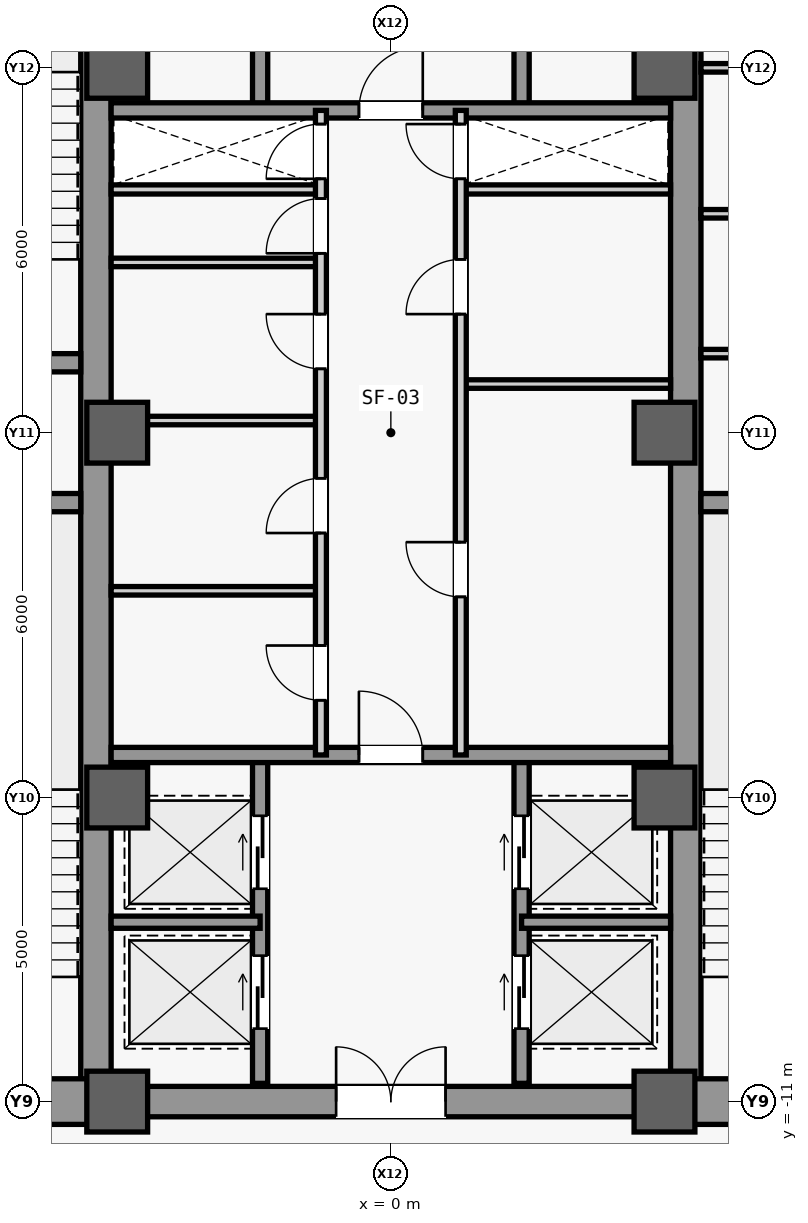
"""IFC4 building model, lengths in metres.
Left out: names, types, materials, properties, quantities, classifications, styles, units other than length and angle.
Written with IfcOpenShell. Run it as: python <this file> out.ifc"""

import sys

from ifc_helpers import new_model, si_unit, direction, frame, frame_2d, origin, origin_2d, place, context, subcontext, project, spatial, rectangle, extrude, source, transform, mapped, element, fill, save


model = new_model("IFC4")
c1 = context("Model", 3, precision=1e-05, world=origin(), true_north=direction((0.0, 1.0)))
c2 = subcontext(c1, "Body", "Model", "MODEL_VIEW")
j1 = project(units=[si_unit("LENGTHUNIT", "METRE"), si_unit("PLANEANGLEUNIT", "RADIAN")], contexts=[c1])
p1 = place(None, origin())
s1 = spatial("IfcSite", under=j1, at=p1, CompositionType="ELEMENT")
p2 = place(p1, origin())
s2 = spatial("IfcBuilding", under=s1, at=p2, CompositionType="ELEMENT")
p3 = place(p2, frame((0.0, 0.0, 103.7)))
s3 = spatial("IfcBuildingStorey", under=s2, at=p3, CompositionType="ELEMENT", Elevation=103.7)
m1 = source(origin(), c2, "Body", "SweptSolid", [
    extrude(rectangle(XDim=21.4, YDim=0.5, at=frame_2d((10.7, 0.0))), origin(), (0.0, 0.0, 1.0), 3.84),
])
for number, where, z_axis, x_axis in (
    (1, (-4.85, -10.7, 0.0), (0.0, 0.0, 1.0), (0.0, 1.0, 0.0)),
    (2, (4.85, -10.7, 0.0), (0.0, 0.0, 1.0), (0.0, 1.0, 0.0)),
):
    element("IfcWall", number, at=place(p3, frame(where, z_axis=z_axis, x_axis=x_axis)), inside=s3, PredefinedType="SHEAR", context=c2, shape_type="MappedRepresentation", body=[
        mapped(m1, transform((0.0, 0.0, 0.0), scale=1.0)),
    ])
m2 = source(origin(), c2, "Body", "SweptSolid", [
    extrude(rectangle(XDim=5.85, YDim=0.75, at=frame_2d((2.925, 0.0))), origin(), (0.0, 0.0, 1.0), 3.84),
])
for number, where, z_axis, x_axis in (
    (3, (-10.7, -11.0, 0.0), (0.0, 0.0, 1.0), (1.0, 0.0, 0.0)),
    (4, (4.85, -11.0, 0.0), (0.0, 0.0, 1.0), (1.0, 0.0, 0.0)),
):
    element("IfcWall", number, at=place(p3, frame(where, z_axis=z_axis, x_axis=x_axis)), inside=s3, PredefinedType="SHEAR", context=c2, shape_type="MappedRepresentation", body=[
        mapped(m2, transform((0.0, 0.0, 0.0), scale=1.0)),
    ])
m3 = source(origin(), c2, "Body", "SweptSolid", [
    extrude(rectangle(XDim=5.6, YDim=0.3, at=frame_2d((2.8, 0.0))), origin(), (0.0, 0.0, 1.0), 3.84),
])
for number, where, z_axis, x_axis in (
    (5, (-10.7, -1.15, 0.0), (0.0, 0.0, 1.0), (1.0, 0.0, 0.0)),
    (6, (-10.7, 1.15, 0.0), (0.0, 0.0, 1.0), (1.0, 0.0, 0.0)),
    (7, (5.1, -1.15, 0.0), (0.0, 0.0, 1.0), (1.0, 0.0, 0.0)),
):
    element("IfcWall", number, at=place(p3, frame(where, z_axis=z_axis, x_axis=x_axis)), inside=s3, PredefinedType="SHEAR", context=c2, shape_type="MappedRepresentation", body=[
        mapped(m3, transform((0.0, 0.0, 0.0), scale=1.0)),
    ])
m4 = source(origin(), c2, "Body", "SweptSolid", [
    extrude(rectangle(XDim=9.2, YDim=0.5, at=frame_2d((4.6, 0.0))), origin(), (0.0, 0.0, 1.0), 3.84),
])
p4 = place(p3, frame((-4.6, -11.0, 0.0), z_axis=(0.0, 0.0, 1.0), x_axis=(1.0, 0.0, 0.0)))
e8 = element("IfcWall", 8, at=p4, inside=s3, PredefinedType="SHEAR", context=c2, shape_type="MappedRepresentation", body=[
    mapped(m4, transform((0.0, 0.0, 0.0), scale=1.0)),
])
m5 = source(origin(), c2, "Body", "SweptSolid", [
    extrude(rectangle(XDim=1.8, YDim=2.25, at=frame_2d((0.9, 1.125))), frame((0.0, 0.26, 0.0), z_axis=(0.0, -1.0, 0.0), x_axis=(1.0, 0.0, 0.0)), (0.0, 0.0, 1.0), 0.52),
])
p5 = place(p4, frame((3.7, 0.0, 0.0)))
e9 = element("IfcOpeningElement", 9, at=p5, cuts=e8, PredefinedType="OPENING", context=c2, shape_type="MappedRepresentation", body=[
    mapped(m5, transform((0.0, 0.0, 0.0), scale=1.0)),
])
m6 = source(origin(), c2, "Body", "SweptSolid", [
    extrude(rectangle(XDim=1.0, YDim=1.0, at=origin_2d()), origin(), (0.0, 0.0, 1.0), 4.1),
])
for number, where, z_axis, x_axis in (
    (10, (-4.5, -11.0, 0.0), (0.0, 0.0, 1.0), (1.0, 0.0, 0.0)),
    (11, (-4.5, -6.0, 0.0), (0.0, 0.0, 1.0), (1.0, 0.0, 0.0)),
    (12, (-4.5, 0.0, 0.0), (0.0, 0.0, 1.0), (1.0, 0.0, 0.0)),
    (13, (-4.5, 6.0, 0.0), (0.0, 0.0, 1.0), (1.0, 0.0, 0.0)),
    (14, (4.5, -11.0, 0.0), (0.0, 0.0, 1.0), (1.0, 0.0, 0.0)),
    (15, (4.5, -6.0, 0.0), (0.0, 0.0, 1.0), (1.0, 0.0, 0.0)),
    (16, (4.5, 0.0, 0.0), (0.0, 0.0, 1.0), (1.0, 0.0, 0.0)),
    (17, (4.5, 6.0, 0.0), (0.0, 0.0, 1.0), (1.0, 0.0, 0.0)),
):
    element("IfcColumn", number, at=place(p3, frame(where, z_axis=z_axis, x_axis=x_axis)), inside=s3, PredefinedType="COLUMN", context=c2, shape_type="MappedRepresentation", body=[
        mapped(m6, transform((0.0, 0.0, 0.0), scale=1.0)),
    ])
m7 = source(origin(), c2, "Body", "SweptSolid", [
    extrude(rectangle(XDim=3.15, YDim=0.14, at=frame_2d((1.575, 0.0))), origin(), (0.0, 0.0, 1.0), 3.84),
])
p6 = place(p3, frame((5.1, 1.3, 0.0), z_axis=(0.0, 0.0, 1.0), x_axis=(1.0, 0.0, 0.0)))
e18 = element("IfcWall", 18, at=p6, inside=s3, PredefinedType="PARTITIONING", context=c2, shape_type="MappedRepresentation", body=[
    mapped(m7, transform((0.0, 0.0, 0.0), scale=1.0)),
])
p7 = place(p3, frame((5.1, 6.0, 0.0), z_axis=(0.0, 0.0, 1.0), x_axis=(1.0, 0.0, 0.0)))
e19 = element("IfcWall", 19, at=p7, inside=s3, PredefinedType="PARTITIONING", context=c2, shape_type="MappedRepresentation", body=[
    mapped(m7, transform((0.0, 0.0, 0.0), scale=1.0)),
])
m8 = source(origin(), c2, "Body", "SweptSolid", [
    extrude(rectangle(XDim=0.9, YDim=2.15, at=frame_2d((0.45, 1.075))), frame((0.0, 0.08, 0.0), z_axis=(0.0, -1.0, 0.0), x_axis=(1.0, 0.0, 0.0)), (0.0, 0.0, 1.0), 0.16),
])
p8 = place(p7, frame((1.13, 0.0, 0.0)))
e20 = element("IfcOpeningElement", 20, at=p8, cuts=e19, PredefinedType="OPENING", context=c2, shape_type="MappedRepresentation", body=[
    mapped(m8, transform((0.0, 0.0, 0.0), scale=1.0)),
])
p9 = place(p3, frame((5.1, 3.6, 0.0), z_axis=(0.0, 0.0, 1.0), x_axis=(1.0, 0.0, 0.0)))
e21 = element("IfcWall", 21, at=p9, inside=s3, PredefinedType="PARTITIONING", context=c2, shape_type="MappedRepresentation", body=[
    mapped(m7, transform((0.0, 0.0, 0.0), scale=1.0)),
])
p10 = place(p9, frame((1.13, 0.0, 0.0)))
e22 = element("IfcOpeningElement", 22, at=p10, cuts=e21, PredefinedType="OPENING", context=c2, shape_type="MappedRepresentation", body=[
    mapped(m8, transform((0.0, 0.0, 0.0), scale=1.0)),
])
m9 = source(origin(), c2, "Body", "SweptSolid", [
    extrude(rectangle(XDim=3.45, YDim=0.15, at=frame_2d((1.725, 0.0))), origin(), (0.0, 0.0, 1.0), 3.84),
])
for number, where, z_axis, x_axis in (
    (23, (-4.6, 4.0, 0.0), (0.0, 0.0, 1.0), (1.0, 0.0, 0.0)),
    (24, (1.15, 4.0, 0.0), (0.0, 0.0, 1.0), (1.0, 0.0, 0.0)),
):
    element("IfcWall", number, at=place(p3, frame(where, z_axis=z_axis, x_axis=x_axis)), inside=s3, PredefinedType="PARTITIONING", context=c2, shape_type="MappedRepresentation", body=[
        mapped(m9, transform((0.0, 0.0, 0.0), scale=1.0)),
    ])
m10 = source(origin(), c2, "Body", "SweptSolid", [
    extrude(rectangle(XDim=5.4, YDim=0.25, at=frame_2d((2.7, 0.0))), origin(), (0.0, 0.0, 1.0), 3.84),
])
p11 = place(p3, frame((-2.15, -10.7, 0.0), z_axis=(0.0, 0.0, 1.0), x_axis=(0.0, 1.0, 0.0)))
e25 = element("IfcWall", 25, at=p11, inside=s3, PredefinedType="SHEAR", context=c2, shape_type="MappedRepresentation", body=[
    mapped(m10, transform((0.0, 0.0, 0.0), scale=1.0)),
])
m11 = source(origin(), c2, "Body", "SweptSolid", [
    extrude(rectangle(XDim=1.2, YDim=2.3, at=frame_2d((0.6, 1.15))), frame((0.0, 0.135, 0.0), z_axis=(0.0, -1.0, 0.0), x_axis=(1.0, 0.0, 0.0)), (0.0, 0.0, 1.0), 0.27),
])
p12 = place(p11, frame((0.9, 0.0, 0.0)))
e26 = element("IfcOpeningElement", 26, at=p12, cuts=e25, PredefinedType="OPENING", context=c2, shape_type="MappedRepresentation", body=[
    mapped(m11, transform((0.0, 0.0, 0.0), scale=1.0)),
])
p13 = place(p11, frame((3.2, 0.0, 0.0)))
e27 = element("IfcOpeningElement", 27, at=p13, cuts=e25, PredefinedType="OPENING", context=c2, shape_type="MappedRepresentation", body=[
    mapped(m11, transform((0.0, 0.0, 0.0), scale=1.0)),
])
p14 = place(p3, frame((2.15, -10.7, 0.0), z_axis=(0.0, 0.0, 1.0), x_axis=(0.0, 1.0, 0.0)))
e28 = element("IfcWall", 28, at=p14, inside=s3, PredefinedType="SHEAR", context=c2, shape_type="MappedRepresentation", body=[
    mapped(m10, transform((0.0, 0.0, 0.0), scale=1.0)),
])
p15 = place(p14, frame((0.9, 0.0, 0.0)))
e29 = element("IfcOpeningElement", 29, at=p15, cuts=e28, PredefinedType="OPENING", context=c2, shape_type="MappedRepresentation", body=[
    mapped(m11, transform((0.0, 0.0, 0.0), scale=1.0)),
])
p16 = place(p14, frame((3.2, 0.0, 0.0)))
e30 = element("IfcOpeningElement", 30, at=p16, cuts=e28, PredefinedType="OPENING", context=c2, shape_type="MappedRepresentation", body=[
    mapped(m11, transform((0.0, 0.0, 0.0), scale=1.0)),
])
m12 = source(origin(), c2, "Body", "SweptSolid", [
    extrude(rectangle(XDim=2.45, YDim=0.2, at=frame_2d((1.225, 0.0))), origin(), (0.0, 0.0, 1.0), 3.84),
])
for number, where, z_axis, x_axis in (
    (31, (-4.6, -8.05, 0.0), (0.0, 0.0, 1.0), (1.0, 0.0, 0.0)),
    (32, (2.15, -8.05, 0.0), (0.0, 0.0, 1.0), (1.0, 0.0, 0.0)),
):
    element("IfcWall", number, at=place(p3, frame(where, z_axis=z_axis, x_axis=x_axis)), inside=s3, PredefinedType="SHEAR", context=c2, shape_type="MappedRepresentation", body=[
        mapped(m12, transform((0.0, 0.0, 0.0), scale=1.0)),
    ])
m13 = source(origin(), c2, "Body", "SweptSolid", [
    extrude(rectangle(XDim=9.2, YDim=0.25, at=frame_2d((4.6, 0.0))), origin(), (0.0, 0.0, 1.0), 3.84),
])
p17 = place(p3, frame((-4.6, -5.3, 0.0), z_axis=(0.0, 0.0, 1.0), x_axis=(1.0, 0.0, 0.0)))
e33 = element("IfcWall", 33, at=p17, inside=s3, PredefinedType="SHEAR", context=c2, shape_type="MappedRepresentation", body=[
    mapped(m13, transform((0.0, 0.0, 0.0), scale=1.0)),
])
m14 = source(origin(), c2, "Body", "SweptSolid", [
    extrude(rectangle(XDim=1.05, YDim=2.2, at=frame_2d((0.525, 1.1))), frame((0.0, 0.135, 0.0), z_axis=(0.0, -1.0, 0.0), x_axis=(1.0, 0.0, 0.0)), (0.0, 0.0, 1.0), 0.27),
])
p18 = place(p17, frame((4.075, 0.0, 0.0)))
e34 = element("IfcOpeningElement", 34, at=p18, cuts=e33, PredefinedType="OPENING", context=c2, shape_type="MappedRepresentation", body=[
    mapped(m14, transform((0.0, 0.0, 0.0), scale=1.0)),
])
for number, where, z_axis, x_axis in (
    (35, (-2.15, 5.3, 0.0), (0.0, 0.0, 1.0), (0.0, 1.0, 0.0)),
    (36, (2.15, 5.3, 0.0), (0.0, 0.0, 1.0), (0.0, 1.0, 0.0)),
):
    element("IfcWall", number, at=place(p3, frame(where, z_axis=z_axis, x_axis=x_axis)), inside=s3, PredefinedType="SHEAR", context=c2, shape_type="MappedRepresentation", body=[
        mapped(m10, transform((0.0, 0.0, 0.0), scale=1.0)),
    ])
p19 = place(p3, frame((-4.6, 5.3, 0.0), z_axis=(0.0, 0.0, 1.0), x_axis=(1.0, 0.0, 0.0)))
e37 = element("IfcWall", 37, at=p19, inside=s3, PredefinedType="SHEAR", context=c2, shape_type="MappedRepresentation", body=[
    mapped(m13, transform((0.0, 0.0, 0.0), scale=1.0)),
])
p20 = place(p19, frame((4.075, 0.0, 0.0)))
e38 = element("IfcOpeningElement", 38, at=p20, cuts=e37, PredefinedType="OPENING", context=c2, shape_type="MappedRepresentation", body=[
    mapped(m14, transform((0.0, 0.0, 0.0), scale=1.0)),
])
m15 = source(origin(), c2, "Body", "SweptSolid", [
    extrude(rectangle(XDim=3.45, YDim=0.14, at=frame_2d((1.725, 0.0))), origin(), (0.0, 0.0, 1.0), 3.84),
])
p21 = place(p3, frame((-4.6, -2.6, 0.0), z_axis=(0.0, 0.0, 1.0), x_axis=(1.0, 0.0, 0.0)))
e39 = element("IfcWall", 39, at=p21, inside=s3, PredefinedType="PARTITIONING", context=c2, shape_type="MappedRepresentation", body=[
    mapped(m15, transform((0.0, 0.0, 0.0), scale=1.0)),
])
m16 = source(origin(), c2, "Body", "SweptSolid", [
    extrude(rectangle(XDim=3.45, YDim=0.14, at=frame_2d((1.725, 0.0))), origin(), (0.0, 0.0, 1.0), 3.145),
])
p22 = place(p3, frame((-4.6, 0.2, 0.0), z_axis=(0.0, 0.0, 1.0), x_axis=(1.0, 0.0, 0.0)))
e40 = element("IfcWall", 40, at=p22, inside=s3, PredefinedType="PARTITIONING", context=c2, shape_type="MappedRepresentation", body=[
    mapped(m16, transform((0.0, 0.0, 0.0), scale=1.0)),
])
p23 = place(p3, frame((-4.6, 2.8, 0.0), z_axis=(0.0, 0.0, 1.0), x_axis=(1.0, 0.0, 0.0)))
e41 = element("IfcWall", 41, at=p23, inside=s3, PredefinedType="PARTITIONING", context=c2, shape_type="MappedRepresentation", body=[
    mapped(m15, transform((0.0, 0.0, 0.0), scale=1.0)),
])
m17 = source(origin(), c2, "Body", "SweptSolid", [
    extrude(rectangle(XDim=10.6, YDim=0.18, at=frame_2d((5.3, 0.0))), origin(), (0.0, 0.0, 1.0), 3.84),
])
p24 = place(p3, frame((-1.15, -5.3, 0.0), z_axis=(0.0, 0.0, 1.0), x_axis=(0.0, 1.0, 0.0)))
e42 = element("IfcWall", 42, at=p24, inside=s3, PredefinedType="PARTITIONING", context=c2, shape_type="MappedRepresentation", body=[
    mapped(m17, transform((0.0, 0.0, 0.0), scale=1.0)),
])
m18 = source(origin(), c2, "Body", "SweptSolid", [
    extrude(rectangle(XDim=0.9, YDim=2.15, at=frame_2d((0.45, 1.075))), frame((0.0, 0.1, 0.0), z_axis=(0.0, -1.0, 0.0), x_axis=(1.0, 0.0, 0.0)), (0.0, 0.0, 1.0), 0.2),
])
p25 = place(p24, frame((0.9, 0.0, 0.0)))
e43 = element("IfcOpeningElement", 43, at=p25, cuts=e42, PredefinedType="OPENING", context=c2, shape_type="MappedRepresentation", body=[
    mapped(m18, transform((0.0, 0.0, 0.0), scale=1.0)),
])
p26 = place(p24, frame((3.65, 0.0, 0.0)))
e44 = element("IfcOpeningElement", 44, at=p26, cuts=e42, PredefinedType="OPENING", context=c2, shape_type="MappedRepresentation", body=[
    mapped(m18, transform((0.0, 0.0, 0.0), scale=1.0)),
])
p27 = place(p24, frame((6.35, 0.0, 0.0)))
e45 = element("IfcOpeningElement", 45, at=p27, cuts=e42, PredefinedType="OPENING", context=c2, shape_type="MappedRepresentation", body=[
    mapped(m18, transform((0.0, 0.0, 0.0), scale=1.0)),
])
p28 = place(p24, frame((8.25, 0.0, 0.0)))
e46 = element("IfcOpeningElement", 46, at=p28, cuts=e42, PredefinedType="OPENING", context=c2, shape_type="MappedRepresentation", body=[
    mapped(m18, transform((0.0, 0.0, 0.0), scale=1.0)),
])
p29 = place(p24, frame((9.475, 0.0, 0.0)))
e47 = element("IfcOpeningElement", 47, at=p29, cuts=e42, PredefinedType="OPENING", context=c2, shape_type="MappedRepresentation", body=[
    mapped(m18, transform((0.0, 0.0, 0.0), scale=1.0)),
])
p30 = place(p3, frame((1.15, 0.8, 0.0), z_axis=(0.0, 0.0, 1.0), x_axis=(1.0, 0.0, 0.0)))
e48 = element("IfcWall", 48, at=p30, inside=s3, PredefinedType="PARTITIONING", context=c2, shape_type="MappedRepresentation", body=[
    mapped(m15, transform((0.0, 0.0, 0.0), scale=1.0)),
])
p31 = place(p3, frame((1.15, -5.3, 0.0), z_axis=(0.0, 0.0, 1.0), x_axis=(0.0, 1.0, 0.0)))
e49 = element("IfcWall", 49, at=p31, inside=s3, PredefinedType="PARTITIONING", context=c2, shape_type="MappedRepresentation", body=[
    mapped(m17, transform((0.0, 0.0, 0.0), scale=1.0)),
])
p32 = place(p31, frame((2.6, 0.0, 0.0)))
e50 = element("IfcOpeningElement", 50, at=p32, cuts=e49, PredefinedType="OPENING", context=c2, shape_type="MappedRepresentation", body=[
    mapped(m18, transform((0.0, 0.0, 0.0), scale=1.0)),
])
p33 = place(p31, frame((7.25, 0.0, 0.0)))
e51 = element("IfcOpeningElement", 51, at=p33, cuts=e49, PredefinedType="OPENING", context=c2, shape_type="MappedRepresentation", body=[
    mapped(m18, transform((0.0, 0.0, 0.0), scale=1.0)),
])
p34 = place(p31, frame((9.475, 0.0, 0.0)))
e52 = element("IfcOpeningElement", 52, at=p34, cuts=e49, PredefinedType="OPENING", context=c2, shape_type="MappedRepresentation", body=[
    mapped(m18, transform((0.0, 0.0, 0.0), scale=1.0)),
])
m19 = source(origin(), c2, "Body", "SweptSolid", [
    extrude(rectangle(XDim=1.05, YDim=2.2, at=frame_2d((0.525, 1.1))), frame((0.0, 0.025, 0.0), z_axis=(0.0, -1.0, 0.0), x_axis=(1.0, 0.0, 0.0)), (0.0, 0.0, 1.0), 0.05),
])
p35 = place(p18, origin())
e53 = element("IfcDoor", 53, at=p35, inside=s3, OperationType="SINGLE_SWING_LEFT", PredefinedType="DOOR", context=c2, shape_type="MappedRepresentation", body=[
    mapped(m19, transform((0.0, 0.0, 0.0), scale=1.0)),
])
fill(e34, e53)
m20 = source(origin(), c2, "Body", "SweptSolid", [
    extrude(rectangle(XDim=1.8, YDim=2.25, at=frame_2d((0.9, 1.125))), frame((0.0, 0.025, 0.0), z_axis=(0.0, -1.0, 0.0), x_axis=(1.0, 0.0, 0.0)), (0.0, 0.0, 1.0), 0.05),
])
p36 = place(p5, origin())
e54 = element("IfcDoor", 54, at=p36, inside=s3, OperationType="SINGLE_SWING_LEFT", PredefinedType="DOOR", context=c2, shape_type="MappedRepresentation", body=[
    mapped(m20, transform((0.0, 0.0, 0.0), scale=1.0)),
])
fill(e9, e54)
p37 = place(p20, origin())
e55 = element("IfcDoor", 55, at=p37, inside=s3, OperationType="SINGLE_SWING_RIGHT", PredefinedType="DOOR", context=c2, shape_type="MappedRepresentation", body=[
    mapped(m19, transform((0.0, 0.0, 0.0), scale=1.0)),
])
fill(e38, e55)
m21 = source(origin(), c2, "Body", "SweptSolid", [
    extrude(rectangle(XDim=0.9, YDim=2.15, at=frame_2d((0.45, 1.075))), frame((0.0, 0.025, 0.0), z_axis=(0.0, -1.0, 0.0), x_axis=(1.0, 0.0, 0.0)), (0.0, 0.0, 1.0), 0.05),
])
p38 = place(p25, origin())
e56 = element("IfcDoor", 56, at=p38, inside=s3, OperationType="SINGLE_SWING_RIGHT", PredefinedType="DOOR", context=c2, shape_type="MappedRepresentation", body=[
    mapped(m21, transform((0.0, 0.0, 0.0), scale=1.0)),
])
fill(e43, e56)
p39 = place(p26, origin())
e57 = element("IfcDoor", 57, at=p39, inside=s3, OperationType="SINGLE_SWING_LEFT", PredefinedType="DOOR", context=c2, shape_type="MappedRepresentation", body=[
    mapped(m21, transform((0.0, 0.0, 0.0), scale=1.0)),
])
fill(e44, e57)
p40 = place(p27, origin())
e58 = element("IfcDoor", 58, at=p40, inside=s3, OperationType="SINGLE_SWING_RIGHT", PredefinedType="DOOR", context=c2, shape_type="MappedRepresentation", body=[
    mapped(m21, transform((0.0, 0.0, 0.0), scale=1.0)),
])
fill(e45, e58)
p41 = place(p28, origin())
e59 = element("IfcDoor", 59, at=p41, inside=s3, OperationType="SINGLE_SWING_LEFT", PredefinedType="DOOR", context=c2, shape_type="MappedRepresentation", body=[
    mapped(m21, transform((0.0, 0.0, 0.0), scale=1.0)),
])
fill(e46, e59)
p42 = place(p32, origin())
e60 = element("IfcDoor", 60, at=p42, inside=s3, OperationType="SINGLE_SWING_RIGHT", PredefinedType="DOOR", context=c2, shape_type="MappedRepresentation", body=[
    mapped(m21, transform((0.0, 0.0, 0.0), scale=1.0)),
])
fill(e50, e60)
p43 = place(p33, origin())
e61 = element("IfcDoor", 61, at=p43, inside=s3, OperationType="SINGLE_SWING_LEFT", PredefinedType="DOOR", context=c2, shape_type="MappedRepresentation", body=[
    mapped(m21, transform((0.0, 0.0, 0.0), scale=1.0)),
])
fill(e51, e61)
p44 = place(p29, origin())
e62 = element("IfcDoor", 62, at=p44, inside=s3, OperationType="SINGLE_SWING_LEFT", PredefinedType="DOOR", context=c2, shape_type="MappedRepresentation", body=[
    mapped(m21, transform((0.0, 0.0, 0.0), scale=1.0)),
])
fill(e47, e62)
p45 = place(p34, origin())
e63 = element("IfcDoor", 63, at=p45, inside=s3, OperationType="SINGLE_SWING_RIGHT", PredefinedType="DOOR", context=c2, shape_type="MappedRepresentation", body=[
    mapped(m21, transform((0.0, 0.0, 0.0), scale=1.0)),
])
fill(e52, e63)
m22 = source(origin(), c2, "Body", "SweptSolid", [
    extrude(rectangle(XDim=1.2, YDim=2.3, at=frame_2d((0.6, 1.15))), frame((0.0, 0.025, 0.0), z_axis=(0.0, -1.0, 0.0), x_axis=(1.0, 0.0, 0.0)), (0.0, 0.0, 1.0), 0.05),
])
p46 = place(p12, origin())
e64 = element("IfcDoor", 64, at=p46, inside=s3, OperationType="SLIDING_TO_LEFT", PredefinedType="DOOR", context=c2, shape_type="MappedRepresentation", body=[
    mapped(m22, transform((0.0, 0.0, 0.0), scale=1.0)),
])
fill(e26, e64)
p47 = place(p15, origin())
e65 = element("IfcDoor", 65, at=p47, inside=s3, OperationType="SLIDING_TO_LEFT", PredefinedType="DOOR", context=c2, shape_type="MappedRepresentation", body=[
    mapped(m22, transform((0.0, 0.0, 0.0), scale=1.0)),
])
fill(e29, e65)
p48 = place(p13, origin())
e66 = element("IfcDoor", 66, at=p48, inside=s3, OperationType="SLIDING_TO_LEFT", PredefinedType="DOOR", context=c2, shape_type="MappedRepresentation", body=[
    mapped(m22, transform((0.0, 0.0, 0.0), scale=1.0)),
])
fill(e27, e66)
p49 = place(p16, origin())
e67 = element("IfcDoor", 67, at=p49, inside=s3, OperationType="SLIDING_TO_LEFT", PredefinedType="DOOR", context=c2, shape_type="MappedRepresentation", body=[
    mapped(m22, transform((0.0, 0.0, 0.0), scale=1.0)),
])
fill(e30, e67)
save(model, sys.argv[1])
